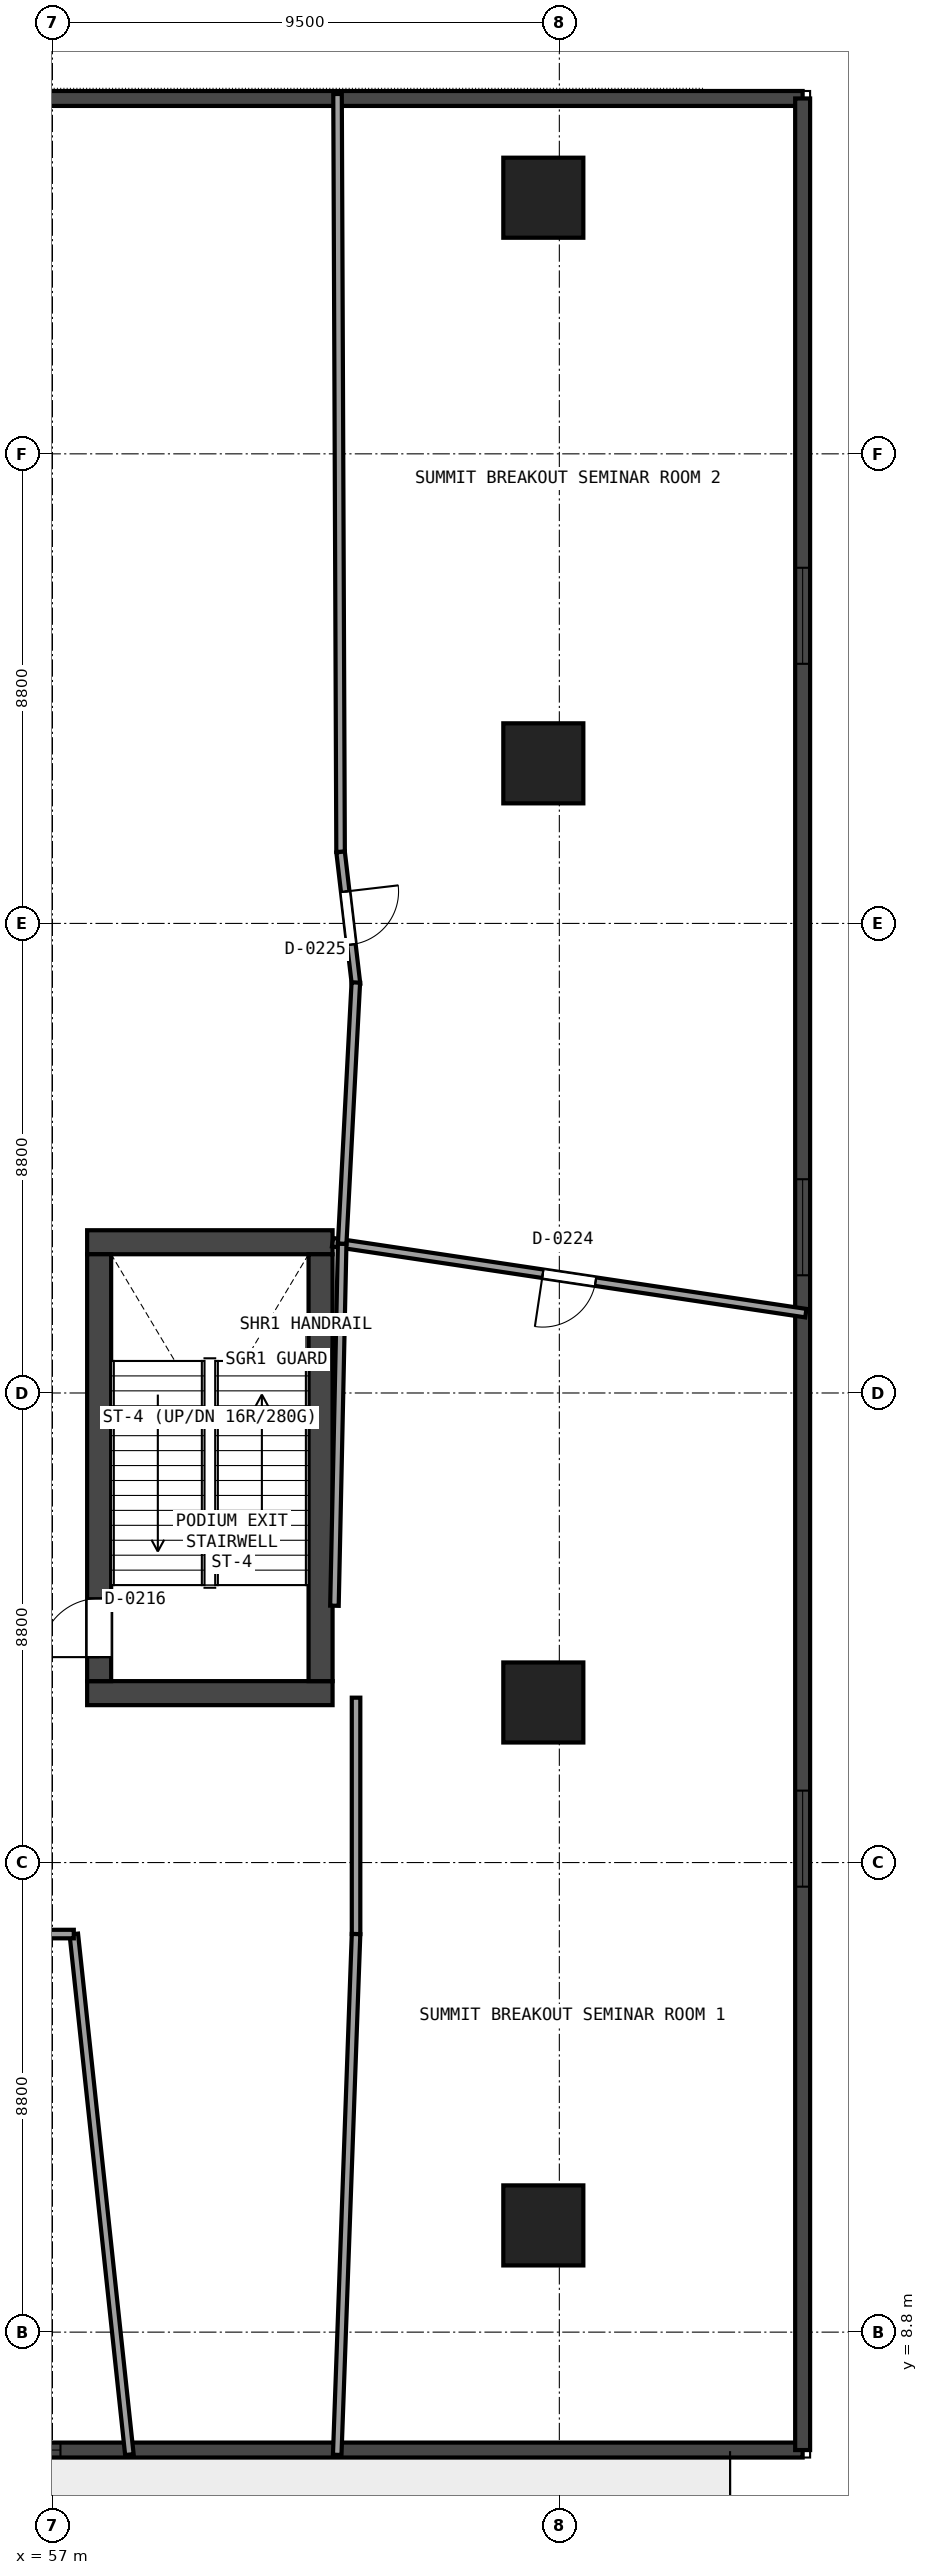
"""IFC4 building model, lengths in metres.
Left out: names, types, materials, properties, quantities, classifications, styles, units other than length and angle.
Written with IfcOpenShell. Run it as: python <this file> out.ifc"""

import sys

from ifc_helpers import new_model, si_unit, direction, frame, frame_2d, origin, origin_2d, place, context, subcontext, project, spatial, rectangle, extrude, element, fill, save


model = new_model("IFC4")
c1 = context("Model", 3, precision=1e-05, world=origin(), true_north=direction((0.0, 1.0)))
c2 = subcontext(c1, "Body", "Model", "MODEL_VIEW")
j1 = project(units=[si_unit("LENGTHUNIT", "METRE"), si_unit("PLANEANGLEUNIT", "RADIAN")], contexts=[c1])
p1 = place(None, origin())
s1 = spatial("IfcSite", under=j1, at=p1, CompositionType="ELEMENT")
p2 = place(p1, origin())
s2 = spatial("IfcBuilding", under=s1, at=p2, CompositionType="ELEMENT")
p3 = place(p2, frame((0.0, 0.0, 10.8)))
s3 = spatial("IfcBuildingStorey", under=s2, at=p3, CompositionType="ELEMENT", Elevation=10.8)
for number, where, z_axis, x_axis in (
    (1, (57.65, 20.775, 0.0), (0.0, 0.0, 1.0), (1.0, 0.0, 0.0)),
    (2, (57.65, 29.225, 0.0), (0.0, 0.0, 1.0), (1.0, 0.0, 0.0)),
):
    element("IfcWall", number, at=place(p3, frame(where, z_axis=z_axis, x_axis=x_axis)), inside=s3, PredefinedType="SHEAR", context=c2, shape_type="SweptSolid", body=[
        extrude(rectangle(XDim=4.6, YDim=0.45, at=frame_2d((2.3, 0.0))), origin(), (0.0, 0.0, 1.0), 5.05),
    ])
p4 = place(p3, frame((57.875, 21.0, 0.0), z_axis=(0.0, 0.0, 1.0), x_axis=(0.0, 1.0, 0.0)))
e3 = element("IfcWall", 3, at=p4, inside=s3, PredefinedType="SHEAR", context=c2, shape_type="SweptSolid", body=[
    extrude(rectangle(XDim=8.0, YDim=0.45, at=frame_2d((4.0, 0.0))), origin(), (0.0, 0.0, 1.0), 5.05),
])
p5 = place(p4, frame((0.45, 0.0, 0.0)))
e4 = element("IfcOpeningElement", 4, at=p5, cuts=e3, PredefinedType="OPENING", context=c2, shape_type="SweptSolid", body=[
    extrude(rectangle(XDim=1.1, YDim=2.15, at=frame_2d((0.55, 1.075))), frame((0.0, 0.235, 0.0), z_axis=(0.0, -1.0, 0.0), x_axis=(1.0, 0.0, 0.0)), (0.0, 0.0, 1.0), 0.47),
])
p6 = place(p3, frame((62.025, 21.0, 0.0), z_axis=(0.0, 0.0, 1.0), x_axis=(0.0, 1.0, 0.0)))
e5 = element("IfcWall", 5, at=p6, inside=s3, PredefinedType="SHEAR", context=c2, shape_type="SweptSolid", body=[
    extrude(rectangle(XDim=8.0, YDim=0.45, at=frame_2d((4.0, 0.0))), origin(), (0.0, 0.0, 1.0), 5.05),
])
for number, where, z_axis, x_axis in (
    (6, (66.2, 10.8, 0.0), (0.0, 0.0, 1.0), (1.0, 0.0, 0.0)),
    (7, (66.2, 20.6, 0.0), (0.0, 0.0, 1.0), (1.0, 0.0, 0.0)),
    (8, (66.2, 38.2, 0.0), (0.0, 0.0, 1.0), (1.0, 0.0, 0.0)),
    (9, (66.2, 48.8, 0.0), (0.0, 0.0, 1.0), (1.0, 0.0, 0.0)),
):
    element("IfcColumn", number, at=place(p3, frame(where, z_axis=z_axis, x_axis=x_axis)), inside=s3, PredefinedType="COLUMN", context=c2, shape_type="SweptSolid", body=[
        extrude(rectangle(XDim=1.5, YDim=1.5, at=origin_2d()), origin(), (0.0, 0.0, 1.0), 5.05),
    ])
p7 = place(p3, frame((71.06, 6.59, 0.0), z_axis=(0.0, 0.0, 1.0), x_axis=(-1.0, 0.0, 0.0)))
e10 = element("IfcWall", 10, at=p7, inside=s3, PredefinedType="SOLIDWALL", context=c2, shape_type="SweptSolid", body=[
    extrude(rectangle(XDim=67.32, YDim=0.28, at=frame_2d((33.66, 0.0))), origin(), (0.0, 0.0, 1.0), 5.05),
])
p8 = place(p7, frame((13.91, 0.0, 0.95)))
e11 = element("IfcOpeningElement", 11, at=p8, cuts=e10, PredefinedType="OPENING", context=c2, shape_type="SweptSolid", body=[
    extrude(rectangle(XDim=1.8, YDim=2.3, at=frame_2d((0.9, 1.15))), frame((0.0, 0.15, 0.0), z_axis=(0.0, -1.0, 0.0), x_axis=(1.0, 0.0, 0.0)), (0.0, 0.0, 1.0), 0.3),
])
p9 = place(p7, frame((48.917, 0.0, 0.95)))
e12 = element("IfcOpeningElement", 12, at=p9, cuts=e10, PredefinedType="OPENING", context=c2, shape_type="SweptSolid", body=[
    extrude(rectangle(XDim=1.8, YDim=2.3, at=frame_2d((0.9, 1.15))), frame((0.0, 0.15, 0.0), z_axis=(0.0, -1.0, 0.0), x_axis=(1.0, 0.0, 0.0)), (0.0, 0.0, 1.0), 0.3),
])
p10 = place(p7, frame((35.46, 0.0, 0.0)))
e13 = element("IfcOpeningElement", 13, at=p10, cuts=e10, PredefinedType="OPENING", context=c2, shape_type="SweptSolid", body=[
    extrude(rectangle(XDim=1.2, YDim=2.2, at=frame_2d((0.6, 1.1))), frame((0.0, 0.15, 0.0), z_axis=(0.0, -1.0, 0.0), x_axis=(1.0, 0.0, 0.0)), (0.0, 0.0, 1.0), 0.3),
])
p11 = place(p3, frame((3.74, 50.66, 0.0), z_axis=(0.0, 0.0, 1.0), x_axis=(1.0, 0.0, 0.0)))
e14 = element("IfcWall", 14, at=p11, inside=s3, PredefinedType="SOLIDWALL", context=c2, shape_type="SweptSolid", body=[
    extrude(rectangle(XDim=67.32, YDim=0.28, at=frame_2d((33.66, 0.0))), origin(), (0.0, 0.0, 1.0), 5.05),
])
p12 = place(p11, frame((13.91, 0.0, 0.95)))
e15 = element("IfcOpeningElement", 15, at=p12, cuts=e14, PredefinedType="OPENING", context=c2, shape_type="SweptSolid", body=[
    extrude(rectangle(XDim=1.8, YDim=2.3, at=frame_2d((0.9, 1.15))), frame((0.0, 0.15, 0.0), z_axis=(0.0, -1.0, 0.0), x_axis=(1.0, 0.0, 0.0)), (0.0, 0.0, 1.0), 0.3),
])
p13 = place(p11, frame((31.414, 0.0, 0.95)))
e16 = element("IfcOpeningElement", 16, at=p13, cuts=e14, PredefinedType="OPENING", context=c2, shape_type="SweptSolid", body=[
    extrude(rectangle(XDim=1.8, YDim=2.3, at=frame_2d((0.9, 1.15))), frame((0.0, 0.15, 0.0), z_axis=(0.0, -1.0, 0.0), x_axis=(1.0, 0.0, 0.0)), (0.0, 0.0, 1.0), 0.3),
])
p14 = place(p3, frame((71.06, 50.66, 0.0), z_axis=(0.0, 0.0, 1.0), x_axis=(0.0, -1.0, 0.0)))
e17 = element("IfcWall", 17, at=p14, inside=s3, PredefinedType="SOLIDWALL", context=c2, shape_type="SweptSolid", body=[
    extrude(rectangle(XDim=44.07, YDim=0.28, at=frame_2d((22.035, 0.0))), origin(), (0.0, 0.0, 1.0), 5.05),
])
p15 = place(p14, frame((8.795, 0.0, 0.95)))
e18 = element("IfcOpeningElement", 18, at=p15, cuts=e17, PredefinedType="OPENING", context=c2, shape_type="SweptSolid", body=[
    extrude(rectangle(XDim=1.8, YDim=2.3, at=frame_2d((0.9, 1.15))), frame((0.0, 0.15, 0.0), z_axis=(0.0, -1.0, 0.0), x_axis=(1.0, 0.0, 0.0)), (0.0, 0.0, 1.0), 0.3),
])
p16 = place(p14, frame((20.254, 0.0, 0.95)))
e19 = element("IfcOpeningElement", 19, at=p16, cuts=e17, PredefinedType="OPENING", context=c2, shape_type="SweptSolid", body=[
    extrude(rectangle(XDim=1.8, YDim=2.3, at=frame_2d((0.9, 1.15))), frame((0.0, 0.15, 0.0), z_axis=(0.0, -1.0, 0.0), x_axis=(1.0, 0.0, 0.0)), (0.0, 0.0, 1.0), 0.3),
])
p17 = place(p14, frame((31.712, 0.0, 0.95)))
e20 = element("IfcOpeningElement", 20, at=p17, cuts=e17, PredefinedType="OPENING", context=c2, shape_type="SweptSolid", body=[
    extrude(rectangle(XDim=1.8, YDim=2.3, at=frame_2d((0.9, 1.15))), frame((0.0, 0.15, 0.0), z_axis=(0.0, -1.0, 0.0), x_axis=(1.0, 0.0, 0.0)), (0.0, 0.0, 1.0), 0.3),
])
p18 = place(p3, frame((58.442, 6.505, 0.0), z_axis=(0.0, 0.0, 1.0), x_axis=(-0.106210644154, 0.9943436524, 0.0)))
e21 = element("IfcWall", 21, at=p18, inside=s3, PredefinedType="PARTITIONING", context=c2, shape_type="SweptSolid", body=[
    extrude(rectangle(XDim=9.811, YDim=0.16, at=frame_2d((4.905, 0.0))), origin(), (0.0, 0.0, 1.0), 4.191),
])
p19 = place(p3, frame((57.4, 16.26, 0.0), z_axis=(0.0, 0.0, 1.0), x_axis=(-0.99999999956, 2.967205e-05, 0.0)))
e22 = element("IfcWall", 22, at=p19, inside=s3, PredefinedType="PARTITIONING", context=c2, shape_type="SweptSolid", body=[
    extrude(rectangle(XDim=32.912, YDim=0.16, at=frame_2d((16.456, 0.0))), origin(), (0.0, 0.0, 1.0), 4.203),
])
p20 = place(p19, frame((15.956, 0.0, 0.0)))
e23 = element("IfcOpeningElement", 23, at=p20, cuts=e22, PredefinedType="OPENING", context=c2, shape_type="SweptSolid", body=[
    extrude(rectangle(XDim=1.0, YDim=2.15, at=frame_2d((0.5, 1.075))), frame((0.0, 0.09, 0.0), z_axis=(0.0, -1.0, 0.0), x_axis=(1.0, 0.0, 0.0)), (0.0, 0.0, 1.0), 0.18),
])
p21 = place(p3, frame((71.12, 27.896, 0.0), z_axis=(0.0, 0.0, 1.0), x_axis=(-0.988959501166, 0.148186048782, 0.0)))
e24 = element("IfcWall", 24, at=p21, inside=s3, PredefinedType="PARTITIONING", context=c2, shape_type="SweptSolid", body=[
    extrude(rectangle(XDim=8.969, YDim=0.16, at=frame_2d((4.485, 0.0))), origin(), (0.0, 0.0, 1.0), 4.191),
])
p22 = place(p21, frame((3.985, 0.0, 0.0)))
e25 = element("IfcOpeningElement", 25, at=p22, cuts=e24, PredefinedType="OPENING", context=c2, shape_type="SweptSolid", body=[
    extrude(rectangle(XDim=1.0, YDim=2.15, at=frame_2d((0.5, 1.075))), frame((0.0, 0.09, 0.0), z_axis=(0.0, -1.0, 0.0), x_axis=(1.0, 0.0, 0.0)), (0.0, 0.0, 1.0), 0.18),
])
p23 = place(p3, frame((62.43, 29.198, 0.0), z_axis=(0.0, 0.0, 1.0), x_axis=(-0.021368945517, -0.999771658014, 0.0)))
e26 = element("IfcWall", 26, at=p23, inside=s3, PredefinedType="PARTITIONING", context=c2, shape_type="SweptSolid", body=[
    extrude(rectangle(XDim=6.786, YDim=0.16, at=frame_2d((3.393, 0.0))), origin(), (0.0, 0.0, 1.0), 5.05),
])
p24 = place(p3, frame((62.69, 20.69, 0.0), z_axis=(0.0, 0.0, 1.0), x_axis=(0.0, -1.0, 0.0)))
e27 = element("IfcWall", 27, at=p24, inside=s3, PredefinedType="PARTITIONING", context=c2, shape_type="SweptSolid", body=[
    extrude(rectangle(XDim=4.43, YDim=0.16, at=frame_2d((2.215, 0.0))), origin(), (0.0, 0.0, 1.0), 4.135),
])
p25 = place(p3, frame((62.69, 16.26, 0.0), z_axis=(0.0, 0.0, 1.0), x_axis=(-0.036147159792, -0.999346477874, 0.0)))
e28 = element("IfcWall", 28, at=p25, inside=s3, PredefinedType="PARTITIONING", context=c2, shape_type="SweptSolid", body=[
    extrude(rectangle(XDim=9.766, YDim=0.16, at=frame_2d((4.883, 0.0))), origin(), (0.0, 0.0, 1.0), 4.191),
])
p26 = place(p3, frame((62.343, 50.744, 0.0), z_axis=(0.0, 0.0, 1.0), x_axis=(0.00400484937, -0.999991980559, 0.0)))
e29 = element("IfcWall", 29, at=p26, inside=s3, PredefinedType="PARTITIONING", context=c2, shape_type="SweptSolid", body=[
    extrude(rectangle(XDim=14.204, YDim=0.16, at=frame_2d((7.102, 0.0))), origin(), (0.0, 0.0, 1.0), 4.135),
])
p27 = place(p3, frame((62.4, 36.54, 0.0), z_axis=(0.0, 0.0, 1.0), x_axis=(0.116160443909, -0.993230462315, 0.0)))
e30 = element("IfcWall", 30, at=p27, inside=s3, PredefinedType="PARTITIONING", context=c2, shape_type="SweptSolid", body=[
    extrude(rectangle(XDim=2.497, YDim=0.16, at=frame_2d((1.249, 0.0))), origin(), (0.0, 0.0, 1.0), 4.679),
])
p28 = place(p27, frame((0.748, 0.0, 0.0)))
e31 = element("IfcOpeningElement", 31, at=p28, cuts=e30, PredefinedType="OPENING", context=c2, shape_type="SweptSolid", body=[
    extrude(rectangle(XDim=1.0, YDim=2.15, at=frame_2d((0.5, 1.075))), frame((0.0, 0.09, 0.0), z_axis=(0.0, -1.0, 0.0), x_axis=(1.0, 0.0, 0.0)), (0.0, 0.0, 1.0), 0.18),
])
p29 = place(p3, frame((62.686, 34.093, 0.0), z_axis=(0.0, 0.0, 1.0), x_axis=(-0.05224774202, -0.998634153959, 0.0)))
e32 = element("IfcWall", 32, at=p29, inside=s3, PredefinedType="PARTITIONING", context=c2, shape_type="SweptSolid", body=[
    extrude(rectangle(XDim=4.902, YDim=0.16, at=frame_2d((2.451, 0.0))), origin(), (0.0, 0.0, 1.0), 5.05),
])
p30 = place(p15, origin())
e33 = element("IfcWindow", 33, at=p30, inside=s3, PartitioningType="SINGLE_PANEL", PredefinedType="WINDOW", context=c2, shape_type="SweptSolid", body=[
    extrude(rectangle(XDim=1.8, YDim=2.3, at=frame_2d((0.9, 1.15))), frame((0.0, 0.03, 0.0), z_axis=(0.0, -1.0, 0.0), x_axis=(1.0, 0.0, 0.0)), (0.0, 0.0, 1.0), 0.06),
])
fill(e18, e33)
p31 = place(p16, origin())
e34 = element("IfcWindow", 34, at=p31, inside=s3, PartitioningType="SINGLE_PANEL", PredefinedType="WINDOW", context=c2, shape_type="SweptSolid", body=[
    extrude(rectangle(XDim=1.8, YDim=2.3, at=frame_2d((0.9, 1.15))), frame((0.0, 0.03, 0.0), z_axis=(0.0, -1.0, 0.0), x_axis=(1.0, 0.0, 0.0)), (0.0, 0.0, 1.0), 0.06),
])
fill(e19, e34)
p32 = place(p17, origin())
e35 = element("IfcWindow", 35, at=p32, inside=s3, PartitioningType="SINGLE_PANEL", PredefinedType="WINDOW", context=c2, shape_type="SweptSolid", body=[
    extrude(rectangle(XDim=1.8, YDim=2.3, at=frame_2d((0.9, 1.15))), frame((0.0, 0.03, 0.0), z_axis=(0.0, -1.0, 0.0), x_axis=(1.0, 0.0, 0.0)), (0.0, 0.0, 1.0), 0.06),
])
fill(e20, e35)
p33 = place(p8, origin())
e36 = element("IfcWindow", 36, at=p33, inside=s3, PartitioningType="SINGLE_PANEL", PredefinedType="WINDOW", context=c2, shape_type="SweptSolid", body=[
    extrude(rectangle(XDim=1.8, YDim=2.3, at=frame_2d((0.9, 1.15))), frame((0.0, 0.03, 0.0), z_axis=(0.0, -1.0, 0.0), x_axis=(1.0, 0.0, 0.0)), (0.0, 0.0, 1.0), 0.06),
])
fill(e11, e36)
p34 = place(p5, origin())
e37 = element("IfcDoor", 37, at=p34, inside=s3, OperationType="SINGLE_SWING_LEFT", PredefinedType="DOOR", context=c2, shape_type="SweptSolid", body=[
    extrude(rectangle(XDim=1.1, YDim=2.15, at=frame_2d((0.55, 1.075))), frame((0.0, 0.025, 0.0), z_axis=(0.0, -1.0, 0.0), x_axis=(1.0, 0.0, 0.0)), (0.0, 0.0, 1.0), 0.05),
])
fill(e4, e37)
p35 = place(p22, origin())
e38 = element("IfcDoor", 38, at=p35, inside=s3, OperationType="SINGLE_SWING_RIGHT", PredefinedType="DOOR", context=c2, shape_type="SweptSolid", body=[
    extrude(rectangle(XDim=1.0, YDim=2.15, at=frame_2d((0.5, 1.075))), frame((0.0, 0.025, 0.0), z_axis=(0.0, -1.0, 0.0), x_axis=(1.0, 0.0, 0.0)), (0.0, 0.0, 1.0), 0.05),
])
fill(e25, e38)
p36 = place(p28, origin())
e39 = element("IfcDoor", 39, at=p36, inside=s3, OperationType="SINGLE_SWING_LEFT", PredefinedType="DOOR", context=c2, shape_type="SweptSolid", body=[
    extrude(rectangle(XDim=1.0, YDim=2.15, at=frame_2d((0.5, 1.075))), frame((0.0, 0.025, 0.0), z_axis=(0.0, -1.0, 0.0), x_axis=(1.0, 0.0, 0.0)), (0.0, 0.0, 1.0), 0.05),
])
fill(e31, e39)
save(model, sys.argv[1])
